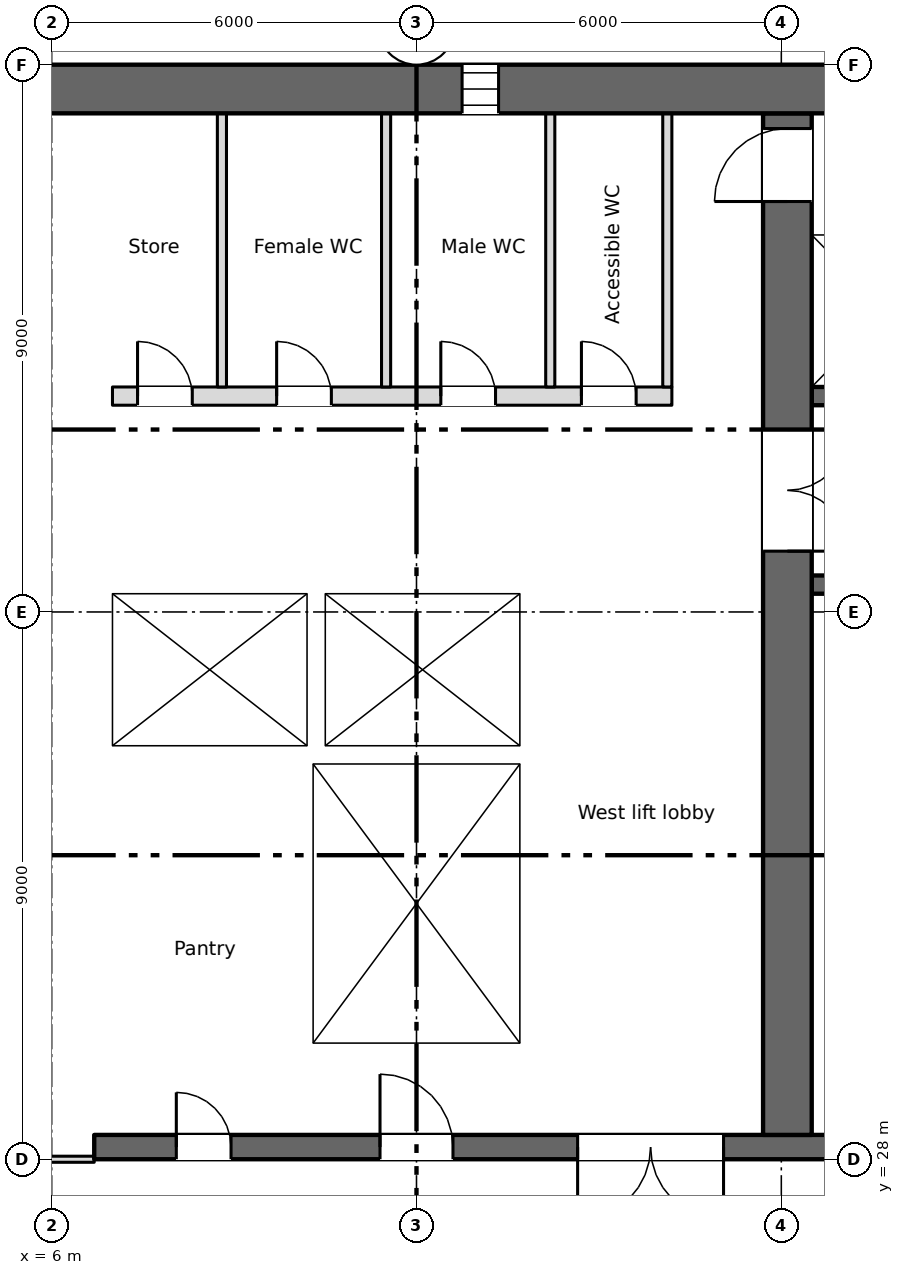
"""IFC4 building model, lengths in metres.
Left out: names, types, materials, properties, quantities, classifications, styles, units other than length and angle.
Written with IfcOpenShell. Run it as: python <this file> out.ifc"""

import sys

from ifc_helpers import new_model, si_unit, direction, frame, frame_2d, origin, place, context, subcontext, project, spatial, rectangle, extrude, element, fill, save


model = new_model("IFC4")
c1 = context("Model", 3, precision=1e-05, world=origin(), true_north=direction((0.0, 1.0)))
c2 = subcontext(c1, "Body", "Model", "MODEL_VIEW")
j1 = project(units=[si_unit("LENGTHUNIT", "METRE"), si_unit("PLANEANGLEUNIT", "RADIAN")], contexts=[c1])
p1 = place(None, origin())
s1 = spatial("IfcSite", under=j1, at=p1, CompositionType="ELEMENT")
p2 = place(p1, origin())
s2 = spatial("IfcBuilding", under=s1, at=p2, CompositionType="ELEMENT")
p3 = place(p2, frame((0.0, 0.0, 128.75)))
s3 = spatial("IfcBuildingStorey", under=s2, at=p3, CompositionType="ELEMENT", Elevation=128.75)
p4 = place(p3, frame((5.55, 45.6, 0.0), z_axis=(0.0, 0.0, 1.0), x_axis=(1.0, 0.0, 0.0)))
e1 = element("IfcWall", 1, at=p4, inside=s3, PredefinedType="SHEAR", context=c2, shape_type="SweptSolid", body=[
    extrude(rectangle(XDim=60.9, YDim=0.8, at=frame_2d((30.45, 0.0))), origin(), (0.0, 0.0, 1.0), 3.35),
])
p5 = place(p4, frame((7.2, 0.0, 0.6)))
e2 = element("IfcOpeningElement", 2, at=p5, cuts=e1, PredefinedType="OPENING", context=c2, shape_type="SweptSolid", body=[
    extrude(rectangle(XDim=0.6, YDim=2.4, at=frame_2d((0.3, 1.2))), frame((0.0, 0.41, 0.0), z_axis=(0.0, -1.0, 0.0), x_axis=(1.0, 0.0, 0.0)), (0.0, 0.0, 1.0), 0.82),
])
p6 = place(p3, frame((6.7, 28.2, 0.0), z_axis=(0.0, 0.0, 1.0), x_axis=(1.0, 0.0, 0.0)))
e3 = element("IfcWall", 3, at=p6, inside=s3, PredefinedType="SHEAR", context=c2, shape_type="SweptSolid", body=[
    extrude(rectangle(XDim=57.8, YDim=0.4, at=frame_2d((28.9, 0.0))), origin(), (0.0, 0.0, 1.0), 3.35),
])
p7 = place(p6, frame((12.062, 0.0, 0.0)))
e4 = element("IfcOpeningElement", 4, at=p7, cuts=e3, PredefinedType="OPENING", context=c2, shape_type="SweptSolid", body=[
    extrude(rectangle(XDim=0.9, YDim=2.1, at=frame_2d((0.45, 1.05))), frame((0.0, 0.21, 0.0), z_axis=(0.0, -1.0, 0.0), x_axis=(1.0, 0.0, 0.0)), (0.0, 0.0, 1.0), 0.42),
])
p8 = place(p6, frame((14.637, 0.0, 0.0)))
e5 = element("IfcOpeningElement", 5, at=p8, cuts=e3, PredefinedType="OPENING", context=c2, shape_type="SweptSolid", body=[
    extrude(rectangle(XDim=0.9, YDim=2.1, at=frame_2d((0.45, 1.05))), frame((0.0, 0.21, 0.0), z_axis=(0.0, -1.0, 0.0), x_axis=(1.0, 0.0, 0.0)), (0.0, 0.0, 1.0), 0.42),
])
p9 = place(p6, frame((49.062, 0.0, 0.0)))
e6 = element("IfcOpeningElement", 6, at=p9, cuts=e3, PredefinedType="OPENING", context=c2, shape_type="SweptSolid", body=[
    extrude(rectangle(XDim=0.9, YDim=2.1, at=frame_2d((0.45, 1.05))), frame((0.0, 0.21, 0.0), z_axis=(0.0, -1.0, 0.0), x_axis=(1.0, 0.0, 0.0)), (0.0, 0.0, 1.0), 0.42),
])
p10 = place(p6, frame((51.637, 0.0, 0.0)))
e7 = element("IfcOpeningElement", 7, at=p10, cuts=e3, PredefinedType="OPENING", context=c2, shape_type="SweptSolid", body=[
    extrude(rectangle(XDim=0.9, YDim=2.1, at=frame_2d((0.45, 1.05))), frame((0.0, 0.21, 0.0), z_axis=(0.0, -1.0, 0.0), x_axis=(1.0, 0.0, 0.0)), (0.0, 0.0, 1.0), 0.42),
])
p11 = place(p6, frame((1.35, 0.0, 0.0)))
e8 = element("IfcOpeningElement", 8, at=p11, cuts=e3, PredefinedType="OPENING", context=c2, shape_type="SweptSolid", body=[
    extrude(rectangle(XDim=0.9, YDim=2.1, at=frame_2d((0.45, 1.05))), frame((0.0, 0.21, 0.0), z_axis=(0.0, -1.0, 0.0), x_axis=(1.0, 0.0, 0.0)), (0.0, 0.0, 1.0), 0.42),
])
p12 = place(p6, frame((4.7, 0.0, 0.0)))
e9 = element("IfcOpeningElement", 9, at=p12, cuts=e3, PredefinedType="OPENING", context=c2, shape_type="SweptSolid", body=[
    extrude(rectangle(XDim=1.2, YDim=2.1, at=frame_2d((0.6, 1.05))), frame((0.0, 0.21, 0.0), z_axis=(0.0, -1.0, 0.0), x_axis=(1.0, 0.0, 0.0)), (0.0, 0.0, 1.0), 0.42),
])
p13 = place(p6, frame((31.7, 0.0, 0.0)))
e10 = element("IfcOpeningElement", 10, at=p13, cuts=e3, PredefinedType="OPENING", context=c2, shape_type="SweptSolid", body=[
    extrude(rectangle(XDim=1.2, YDim=2.1, at=frame_2d((0.6, 1.05))), frame((0.0, 0.21, 0.0), z_axis=(0.0, -1.0, 0.0), x_axis=(1.0, 0.0, 0.0)), (0.0, 0.0, 1.0), 0.42),
])
p14 = place(p6, frame((55.2, 0.0, 0.0)))
e11 = element("IfcOpeningElement", 11, at=p14, cuts=e3, PredefinedType="OPENING", context=c2, shape_type="SweptSolid", body=[
    extrude(rectangle(XDim=1.2, YDim=2.1, at=frame_2d((0.6, 1.05))), frame((0.0, 0.21, 0.0), z_axis=(0.0, -1.0, 0.0), x_axis=(1.0, 0.0, 0.0)), (0.0, 0.0, 1.0), 0.42),
])
p15 = place(p6, frame((21.7, 0.0, 0.0)))
e12 = element("IfcOpeningElement", 12, at=p15, cuts=e3, PredefinedType="OPENING", context=c2, shape_type="SweptSolid", body=[
    extrude(rectangle(XDim=1.2, YDim=2.1, at=frame_2d((0.6, 1.05))), frame((0.0, 0.21, 0.0), z_axis=(0.0, -1.0, 0.0), x_axis=(1.0, 0.0, 0.0)), (0.0, 0.0, 1.0), 0.42),
])
p16 = place(p6, frame((41.7, 0.0, 0.0)))
e13 = element("IfcOpeningElement", 13, at=p16, cuts=e3, PredefinedType="OPENING", context=c2, shape_type="SweptSolid", body=[
    extrude(rectangle(XDim=1.2, YDim=2.1, at=frame_2d((0.6, 1.05))), frame((0.0, 0.21, 0.0), z_axis=(0.0, -1.0, 0.0), x_axis=(1.0, 0.0, 0.0)), (0.0, 0.0, 1.0), 0.42),
])
p17 = place(p6, frame((24.85, 0.0, 0.0)))
e14 = element("IfcOpeningElement", 14, at=p17, cuts=e3, PredefinedType="OPENING", context=c2, shape_type="SweptSolid", body=[
    extrude(rectangle(XDim=2.4, YDim=2.1, at=frame_2d((1.2, 1.05))), frame((0.0, 0.21, 0.0), z_axis=(0.0, -1.0, 0.0), x_axis=(1.0, 0.0, 0.0)), (0.0, 0.0, 1.0), 0.42),
])
p18 = place(p6, frame((37.35, 0.0, 0.0)))
e15 = element("IfcOpeningElement", 15, at=p18, cuts=e3, PredefinedType="OPENING", context=c2, shape_type="SweptSolid", body=[
    extrude(rectangle(XDim=2.4, YDim=2.1, at=frame_2d((1.2, 1.05))), frame((0.0, 0.21, 0.0), z_axis=(0.0, -1.0, 0.0), x_axis=(1.0, 0.0, 0.0)), (0.0, 0.0, 1.0), 0.42),
])
p19 = place(p6, frame((7.95, 0.0, 0.0)))
e16 = element("IfcOpeningElement", 16, at=p19, cuts=e3, PredefinedType="OPENING", context=c2, shape_type="SweptSolid", body=[
    extrude(rectangle(XDim=2.4, YDim=2.1, at=frame_2d((1.2, 1.05))), frame((0.0, 0.21, 0.0), z_axis=(0.0, -1.0, 0.0), x_axis=(1.0, 0.0, 0.0)), (0.0, 0.0, 1.0), 0.42),
])
p20 = place(p6, frame((28.85, 0.0, 0.0)))
e17 = element("IfcOpeningElement", 17, at=p20, cuts=e3, PredefinedType="OPENING", context=c2, shape_type="SweptSolid", body=[
    extrude(rectangle(XDim=0.9, YDim=2.1, at=frame_2d((0.45, 1.05))), frame((0.0, 0.21, 0.0), z_axis=(0.0, -1.0, 0.0), x_axis=(1.0, 0.0, 0.0)), (0.0, 0.0, 1.0), 0.42),
])
p21 = place(p6, frame((34.85, 0.0, 0.0)))
e18 = element("IfcOpeningElement", 18, at=p21, cuts=e3, PredefinedType="OPENING", context=c2, shape_type="SweptSolid", body=[
    extrude(rectangle(XDim=0.9, YDim=2.1, at=frame_2d((0.45, 1.05))), frame((0.0, 0.21, 0.0), z_axis=(0.0, -1.0, 0.0), x_axis=(1.0, 0.0, 0.0)), (0.0, 0.0, 1.0), 0.42),
])
p22 = place(p3, frame((6.85, 28.4, 0.0), z_axis=(0.0, 0.0, 1.0), x_axis=(0.0, 1.0, 0.0)))
e19 = element("IfcWall", 19, at=p22, inside=s3, PredefinedType="SHEAR", context=c2, shape_type="SweptSolid", body=[
    extrude(rectangle(XDim=16.8, YDim=0.3, at=frame_2d((8.4, 0.0))), origin(), (0.0, 0.0, 1.0), 3.35),
])
p23 = place(p3, frame((18.1, 28.4, 0.0), z_axis=(0.0, 0.0, 1.0), x_axis=(0.0, 1.0, 0.0)))
e20 = element("IfcWall", 20, at=p23, inside=s3, PredefinedType="SHEAR", context=c2, shape_type="SweptSolid", body=[
    extrude(rectangle(XDim=16.8, YDim=0.8, at=frame_2d((8.4, 0.0))), origin(), (0.0, 0.0, 1.0), 3.35),
])
p24 = place(p23, frame((9.6, 0.0, 0.0)))
e21 = element("IfcOpeningElement", 21, at=p24, cuts=e20, PredefinedType="OPENING", context=c2, shape_type="SweptSolid", body=[
    extrude(rectangle(XDim=2.0, YDim=2.1, at=frame_2d((1.0, 1.05))), frame((0.0, 0.41, 0.0), z_axis=(0.0, -1.0, 0.0), x_axis=(1.0, 0.0, 0.0)), (0.0, 0.0, 1.0), 0.82),
])
p25 = place(p23, frame((15.35, 0.0, 0.0)))
e22 = element("IfcOpeningElement", 22, at=p25, cuts=e20, PredefinedType="OPENING", context=c2, shape_type="SweptSolid", body=[
    extrude(rectangle(XDim=1.2, YDim=2.1, at=frame_2d((0.6, 1.05))), frame((0.0, 0.41, 0.0), z_axis=(0.0, -1.0, 0.0), x_axis=(1.0, 0.0, 0.0)), (0.0, 0.0, 1.0), 0.82),
])
for number, where, z_axis, x_axis in (
    (23, (10.15, 28.4, 0.0), (0.0, 0.0, 1.0), (0.0, 1.0, 0.0)),
    (24, (13.85, 28.4, 0.0), (0.0, 0.0, 1.0), (0.0, 1.0, 0.0)),
):
    element("IfcWall", number, at=place(p3, frame(where, z_axis=z_axis, x_axis=x_axis)), inside=s3, PredefinedType="SHEAR", context=c2, shape_type="SweptSolid", body=[
        extrude(rectangle(XDim=6.1, YDim=0.3, at=frame_2d((3.05, 0.0))), origin(), (0.0, 0.0, 1.0), 3.35),
    ])
p26 = place(p3, frame((7.0, 34.65, 0.0), z_axis=(0.0, 0.0, 1.0), x_axis=(1.0, 0.0, 0.0)))
e25 = element("IfcWall", 25, at=p26, inside=s3, PredefinedType="SHEAR", context=c2, shape_type="SweptSolid", body=[
    extrude(rectangle(XDim=7.0, YDim=0.3, at=frame_2d((3.5, 0.0))), origin(), (0.0, 0.0, 1.0), 3.35),
])
p27 = place(p3, frame((18.5, 34.65, 0.0), z_axis=(0.0, 0.0, 1.0), x_axis=(1.0, 0.0, 0.0)))
e26 = element("IfcWall", 26, at=p27, inside=s3, PredefinedType="SHEAR", context=c2, shape_type="SweptSolid", body=[
    extrude(rectangle(XDim=12.2, YDim=0.3, at=frame_2d((6.1, 0.0))), origin(), (0.0, 0.0, 1.0), 3.35),
])
p28 = place(p27, frame((9.8, 0.0, 0.0)))
e27 = element("IfcOpeningElement", 27, at=p28, cuts=e26, PredefinedType="OPENING", context=c2, shape_type="SweptSolid", body=[
    extrude(rectangle(XDim=1.1, YDim=2.1, at=frame_2d((0.55, 1.05))), frame((0.0, 0.16, 0.0), z_axis=(0.0, -1.0, 0.0), x_axis=(1.0, 0.0, 0.0)), (0.0, 0.0, 1.0), 0.32),
])
p29 = place(p3, frame((7.0, 37.45, 0.0), z_axis=(0.0, 0.0, 1.0), x_axis=(1.0, 0.0, 0.0)))
e28 = element("IfcWall", 28, at=p29, inside=s3, PredefinedType="SHEAR", context=c2, shape_type="SweptSolid", body=[
    extrude(rectangle(XDim=7.0, YDim=0.3, at=frame_2d((3.5, 0.0))), origin(), (0.0, 0.0, 1.0), 3.35),
])
p30 = place(p3, frame((30.7, 37.45, 0.0), z_axis=(0.0, 0.0, 1.0), x_axis=(-1.0, 0.0, 0.0)))
e29 = element("IfcWall", 29, at=p30, inside=s3, PredefinedType="SHEAR", context=c2, shape_type="SweptSolid", body=[
    extrude(rectangle(XDim=12.2, YDim=0.3, at=frame_2d((6.1, 0.0))), origin(), (0.0, 0.0, 1.0), 3.35),
])
p31 = place(p30, frame((7.4, 0.0, 0.0)))
e30 = element("IfcOpeningElement", 30, at=p31, cuts=e29, PredefinedType="OPENING", context=c2, shape_type="SweptSolid", body=[
    extrude(rectangle(XDim=0.9, YDim=2.1, at=frame_2d((0.45, 1.05))), frame((0.0, 0.16, 0.0), z_axis=(0.0, -1.0, 0.0), x_axis=(1.0, 0.0, 0.0)), (0.0, 0.0, 1.0), 0.32),
])
p32 = place(p3, frame((13.85, 34.8, 0.0), z_axis=(0.0, 0.0, 1.0), x_axis=(0.0, 1.0, 0.0)))
e31 = element("IfcWall", 31, at=p32, inside=s3, PredefinedType="SHEAR", context=c2, shape_type="SweptSolid", body=[
    extrude(rectangle(XDim=2.5, YDim=0.3, at=frame_2d((1.25, 0.0))), origin(), (0.0, 0.0, 1.0), 3.35),
])
p33 = place(p3, frame((18.5, 40.55, 0.0), z_axis=(0.0, 0.0, 1.0), x_axis=(1.0, 0.0, 0.0)))
e32 = element("IfcWall", 32, at=p33, inside=s3, PredefinedType="SHEAR", context=c2, shape_type="SweptSolid", body=[
    extrude(rectangle(XDim=41.0, YDim=0.3, at=frame_2d((20.5, 0.0))), origin(), (0.0, 0.0, 1.0), 3.35),
])
p34 = place(p33, frame((18.65, 0.0, 0.0)))
e33 = element("IfcOpeningElement", 33, at=p34, cuts=e32, PredefinedType="OPENING", context=c2, shape_type="SweptSolid", body=[
    extrude(rectangle(XDim=0.9, YDim=2.1, at=frame_2d((0.45, 1.05))), frame((0.0, 0.16, 0.0), z_axis=(0.0, -1.0, 0.0), x_axis=(1.0, 0.0, 0.0)), (0.0, 0.0, 1.0), 0.32),
])
p35 = place(p33, frame((6.175, 0.0, 0.0)))
e34 = element("IfcOpeningElement", 34, at=p35, cuts=e32, PredefinedType="OPENING", context=c2, shape_type="SweptSolid", body=[
    extrude(rectangle(XDim=1.1, YDim=2.1, at=frame_2d((0.55, 1.05))), frame((0.0, 0.16, 0.0), z_axis=(0.0, -1.0, 0.0), x_axis=(1.0, 0.0, 0.0)), (0.0, 0.0, 1.0), 0.32),
])
p36 = place(p33, frame((8.925, 0.0, 0.0)))
e35 = element("IfcOpeningElement", 35, at=p36, cuts=e32, PredefinedType="OPENING", context=c2, shape_type="SweptSolid", body=[
    extrude(rectangle(XDim=1.1, YDim=2.1, at=frame_2d((0.55, 1.05))), frame((0.0, 0.16, 0.0), z_axis=(0.0, -1.0, 0.0), x_axis=(1.0, 0.0, 0.0)), (0.0, 0.0, 1.0), 0.32),
])
p37 = place(p33, frame((11.675, 0.0, 0.0)))
e36 = element("IfcOpeningElement", 36, at=p37, cuts=e32, PredefinedType="OPENING", context=c2, shape_type="SweptSolid", body=[
    extrude(rectangle(XDim=1.1, YDim=2.1, at=frame_2d((0.55, 1.05))), frame((0.0, 0.16, 0.0), z_axis=(0.0, -1.0, 0.0), x_axis=(1.0, 0.0, 0.0)), (0.0, 0.0, 1.0), 0.32),
])
p38 = place(p33, frame((30.925, 0.0, 0.0)))
e37 = element("IfcOpeningElement", 37, at=p38, cuts=e32, PredefinedType="OPENING", context=c2, shape_type="SweptSolid", body=[
    extrude(rectangle(XDim=1.1, YDim=2.1, at=frame_2d((0.55, 1.05))), frame((0.0, 0.16, 0.0), z_axis=(0.0, -1.0, 0.0), x_axis=(1.0, 0.0, 0.0)), (0.0, 0.0, 1.0), 0.32),
])
p39 = place(p33, frame((33.675, 0.0, 0.0)))
e38 = element("IfcOpeningElement", 38, at=p39, cuts=e32, PredefinedType="OPENING", context=c2, shape_type="SweptSolid", body=[
    extrude(rectangle(XDim=1.1, YDim=2.1, at=frame_2d((0.55, 1.05))), frame((0.0, 0.16, 0.0), z_axis=(0.0, -1.0, 0.0), x_axis=(1.0, 0.0, 0.0)), (0.0, 0.0, 1.0), 0.32),
])
p40 = place(p33, frame((36.375, 0.0, 0.0)))
e39 = element("IfcOpeningElement", 39, at=p40, cuts=e32, PredefinedType="OPENING", context=c2, shape_type="SweptSolid", body=[
    extrude(rectangle(XDim=1.2, YDim=2.1, at=frame_2d((0.6, 1.05))), frame((0.0, 0.16, 0.0), z_axis=(0.0, -1.0, 0.0), x_axis=(1.0, 0.0, 0.0)), (0.0, 0.0, 1.0), 0.32),
])
p41 = place(p33, frame((39.15, 0.0, 0.0)))
e40 = element("IfcOpeningElement", 40, at=p41, cuts=e32, PredefinedType="OPENING", context=c2, shape_type="SweptSolid", body=[
    extrude(rectangle(XDim=1.2, YDim=2.1, at=frame_2d((0.6, 1.05))), frame((0.0, 0.16, 0.0), z_axis=(0.0, -1.0, 0.0), x_axis=(1.0, 0.0, 0.0)), (0.0, 0.0, 1.0), 0.32),
])
p42 = place(p3, frame((18.5, 43.35, 0.0), z_axis=(0.0, 0.0, 1.0), x_axis=(1.0, 0.0, 0.0)))
e41 = element("IfcWall", 41, at=p42, inside=s3, PredefinedType="SHEAR", context=c2, shape_type="SweptSolid", body=[
    extrude(rectangle(XDim=41.0, YDim=0.3, at=frame_2d((20.5, 0.0))), origin(), (0.0, 0.0, 1.0), 3.35),
])
p43 = place(p3, frame((7.0, 40.55, 0.0), z_axis=(0.0, 0.0, 1.0), x_axis=(1.0, 0.0, 0.0)))
e42 = element("IfcWall", 42, at=p43, inside=s3, PredefinedType="PARTITIONING", context=c2, shape_type="SweptSolid", body=[
    extrude(rectangle(XDim=9.2, YDim=0.3, at=frame_2d((4.6, 0.0))), origin(), (0.0, 0.0, 1.0), 3.35),
])
p44 = place(p43, frame((0.413, 0.0, 0.0)))
e43 = element("IfcOpeningElement", 43, at=p44, cuts=e42, PredefinedType="OPENING", context=c2, shape_type="SweptSolid", body=[
    extrude(rectangle(XDim=0.9, YDim=2.1, at=frame_2d((0.45, 1.05))), frame((0.0, 0.16, 0.0), z_axis=(0.0, -1.0, 0.0), x_axis=(1.0, 0.0, 0.0)), (0.0, 0.0, 1.0), 0.32),
])
p45 = place(p43, frame((2.7, 0.0, 0.0)))
e44 = element("IfcOpeningElement", 44, at=p45, cuts=e42, PredefinedType="OPENING", context=c2, shape_type="SweptSolid", body=[
    extrude(rectangle(XDim=0.9, YDim=2.1, at=frame_2d((0.45, 1.05))), frame((0.0, 0.16, 0.0), z_axis=(0.0, -1.0, 0.0), x_axis=(1.0, 0.0, 0.0)), (0.0, 0.0, 1.0), 0.32),
])
p46 = place(p43, frame((5.4, 0.0, 0.0)))
e45 = element("IfcOpeningElement", 45, at=p46, cuts=e42, PredefinedType="OPENING", context=c2, shape_type="SweptSolid", body=[
    extrude(rectangle(XDim=0.9, YDim=2.1, at=frame_2d((0.45, 1.05))), frame((0.0, 0.16, 0.0), z_axis=(0.0, -1.0, 0.0), x_axis=(1.0, 0.0, 0.0)), (0.0, 0.0, 1.0), 0.32),
])
p47 = place(p43, frame((7.712, 0.0, 0.0)))
e46 = element("IfcOpeningElement", 46, at=p47, cuts=e42, PredefinedType="OPENING", context=c2, shape_type="SweptSolid", body=[
    extrude(rectangle(XDim=0.9, YDim=2.1, at=frame_2d((0.45, 1.05))), frame((0.0, 0.16, 0.0), z_axis=(0.0, -1.0, 0.0), x_axis=(1.0, 0.0, 0.0)), (0.0, 0.0, 1.0), 0.32),
])
p48 = place(p3, frame((10.35, 34.8, 0.0), z_axis=(0.0, 0.0, 1.0), x_axis=(0.0, 1.0, 0.0)))
e47 = element("IfcWall", 47, at=p48, inside=s3, PredefinedType="SHEAR", context=c2, shape_type="SweptSolid", body=[
    extrude(rectangle(XDim=2.5, YDim=0.3, at=frame_2d((1.25, 0.0))), origin(), (0.0, 0.0, 1.0), 3.35),
])
for number, where, z_axis, x_axis in (
    (48, (16.125, 40.7, 0.0), (0.0, 0.0, 1.0), (0.0, 1.0, 0.0)),
    (49, (8.8, 40.7, 0.0), (0.0, 0.0, 1.0), (0.0, 1.0, 0.0)),
    (50, (11.5, 40.7, 0.0), (0.0, 0.0, 1.0), (0.0, 1.0, 0.0)),
    (51, (14.2, 40.7, 0.0), (0.0, 0.0, 1.0), (0.0, 1.0, 0.0)),
):
    element("IfcWall", number, at=place(p3, frame(where, z_axis=z_axis, x_axis=x_axis)), inside=s3, PredefinedType="PARTITIONING", context=c2, shape_type="SweptSolid", body=[
        extrude(rectangle(XDim=4.5, YDim=0.15, at=frame_2d((2.25, 0.0))), origin(), (0.0, 0.0, 1.0), 3.35),
    ])
p49 = place(p3, frame((0.7, 28.0, 0.0), z_axis=(0.0, 0.0, 1.0), x_axis=(1.0, 0.0, 0.0)))
e52 = element("IfcWall", 52, at=p49, inside=s3, PredefinedType="PARTITIONING", context=c2, shape_type="SweptSolid", body=[
    extrude(rectangle(XDim=6.0, YDim=0.1, at=frame_2d((3.0, 0.0))), origin(), (0.0, 0.0, 1.0), 3.35),
])
p50 = place(p49, frame((2.1, 0.0, 0.0)))
e53 = element("IfcOpeningElement", 53, at=p50, cuts=e52, PredefinedType="OPENING", context=c2, shape_type="SweptSolid", body=[
    extrude(rectangle(XDim=1.8, YDim=2.1, at=frame_2d((0.9, 1.05))), frame((0.0, 0.06, 0.0), z_axis=(0.0, -1.0, 0.0), x_axis=(1.0, 0.0, 0.0)), (0.0, 0.0, 1.0), 0.12),
])
p51 = place(p5, origin())
e54 = element("IfcWindow", 54, at=p51, inside=s3, PartitioningType="SINGLE_PANEL", PredefinedType="WINDOW", context=c2, shape_type="SweptSolid", body=[
    extrude(rectangle(XDim=0.6, YDim=2.4, at=frame_2d((0.3, 1.2))), frame((0.0, 0.03, 0.0), z_axis=(0.0, -1.0, 0.0), x_axis=(1.0, 0.0, 0.0)), (0.0, 0.0, 1.0), 0.06),
])
fill(e2, e54)
p52 = place(p11, origin())
e55 = element("IfcDoor", 55, at=p52, inside=s3, OperationType="SINGLE_SWING_LEFT", PredefinedType="DOOR", context=c2, shape_type="SweptSolid", body=[
    extrude(rectangle(XDim=0.9, YDim=2.1, at=frame_2d((0.45, 1.05))), frame((0.0, 0.025, 0.0), z_axis=(0.0, -1.0, 0.0), x_axis=(1.0, 0.0, 0.0)), (0.0, 0.0, 1.0), 0.05),
])
fill(e8, e55)
p53 = place(p44, origin())
e56 = element("IfcDoor", 56, at=p53, inside=s3, OperationType="SINGLE_SWING_LEFT", PredefinedType="DOOR", context=c2, shape_type="SweptSolid", body=[
    extrude(rectangle(XDim=0.9, YDim=2.1, at=frame_2d((0.45, 1.05))), frame((0.0, 0.025, 0.0), z_axis=(0.0, -1.0, 0.0), x_axis=(1.0, 0.0, 0.0)), (0.0, 0.0, 1.0), 0.05),
])
fill(e43, e56)
p54 = place(p45, origin())
e57 = element("IfcDoor", 57, at=p54, inside=s3, OperationType="SINGLE_SWING_LEFT", PredefinedType="DOOR", context=c2, shape_type="SweptSolid", body=[
    extrude(rectangle(XDim=0.9, YDim=2.1, at=frame_2d((0.45, 1.05))), frame((0.0, 0.025, 0.0), z_axis=(0.0, -1.0, 0.0), x_axis=(1.0, 0.0, 0.0)), (0.0, 0.0, 1.0), 0.05),
])
fill(e44, e57)
p55 = place(p46, origin())
e58 = element("IfcDoor", 58, at=p55, inside=s3, OperationType="SINGLE_SWING_LEFT", PredefinedType="DOOR", context=c2, shape_type="SweptSolid", body=[
    extrude(rectangle(XDim=0.9, YDim=2.1, at=frame_2d((0.45, 1.05))), frame((0.0, 0.025, 0.0), z_axis=(0.0, -1.0, 0.0), x_axis=(1.0, 0.0, 0.0)), (0.0, 0.0, 1.0), 0.05),
])
fill(e45, e58)
p56 = place(p47, origin())
e59 = element("IfcDoor", 59, at=p56, inside=s3, OperationType="SINGLE_SWING_LEFT", PredefinedType="DOOR", context=c2, shape_type="SweptSolid", body=[
    extrude(rectangle(XDim=0.9, YDim=2.1, at=frame_2d((0.45, 1.05))), frame((0.0, 0.025, 0.0), z_axis=(0.0, -1.0, 0.0), x_axis=(1.0, 0.0, 0.0)), (0.0, 0.0, 1.0), 0.05),
])
fill(e46, e59)
p57 = place(p12, origin())
e60 = element("IfcDoor", 60, at=p57, inside=s3, OperationType="SINGLE_SWING_LEFT", PredefinedType="DOOR", context=c2, shape_type="SweptSolid", body=[
    extrude(rectangle(XDim=1.2, YDim=2.1, at=frame_2d((0.6, 1.05))), frame((0.0, 0.025, 0.0), z_axis=(0.0, -1.0, 0.0), x_axis=(1.0, 0.0, 0.0)), (0.0, 0.0, 1.0), 0.05),
])
fill(e9, e60)
p58 = place(p19, origin())
e61 = element("IfcDoor", 61, at=p58, inside=s3, OperationType="DOUBLE_DOOR_SINGLE_SWING", PredefinedType="DOOR", context=c2, shape_type="SweptSolid", body=[
    extrude(rectangle(XDim=2.4, YDim=2.1, at=frame_2d((1.2, 1.05))), frame((0.0, 0.025, 0.0), z_axis=(0.0, -1.0, 0.0), x_axis=(1.0, 0.0, 0.0)), (0.0, 0.0, 1.0), 0.05),
])
fill(e16, e61)
p59 = place(p24, origin())
e62 = element("IfcDoor", 62, at=p59, inside=s3, OperationType="DOUBLE_DOOR_SINGLE_SWING", PredefinedType="DOOR", context=c2, shape_type="SweptSolid", body=[
    extrude(rectangle(XDim=2.0, YDim=2.1, at=frame_2d((1.0, 1.05))), frame((0.0, 0.025, 0.0), z_axis=(0.0, -1.0, 0.0), x_axis=(1.0, 0.0, 0.0)), (0.0, 0.0, 1.0), 0.05),
])
fill(e21, e62)
p60 = place(p25, origin())
e63 = element("IfcDoor", 63, at=p60, inside=s3, OperationType="SINGLE_SWING_LEFT", PredefinedType="DOOR", context=c2, shape_type="SweptSolid", body=[
    extrude(rectangle(XDim=1.2, YDim=2.1, at=frame_2d((0.6, 1.05))), frame((0.0, 0.025, 0.0), z_axis=(0.0, -1.0, 0.0), x_axis=(1.0, 0.0, 0.0)), (0.0, 0.0, 1.0), 0.05),
])
fill(e22, e63)
save(model, sys.argv[1])
